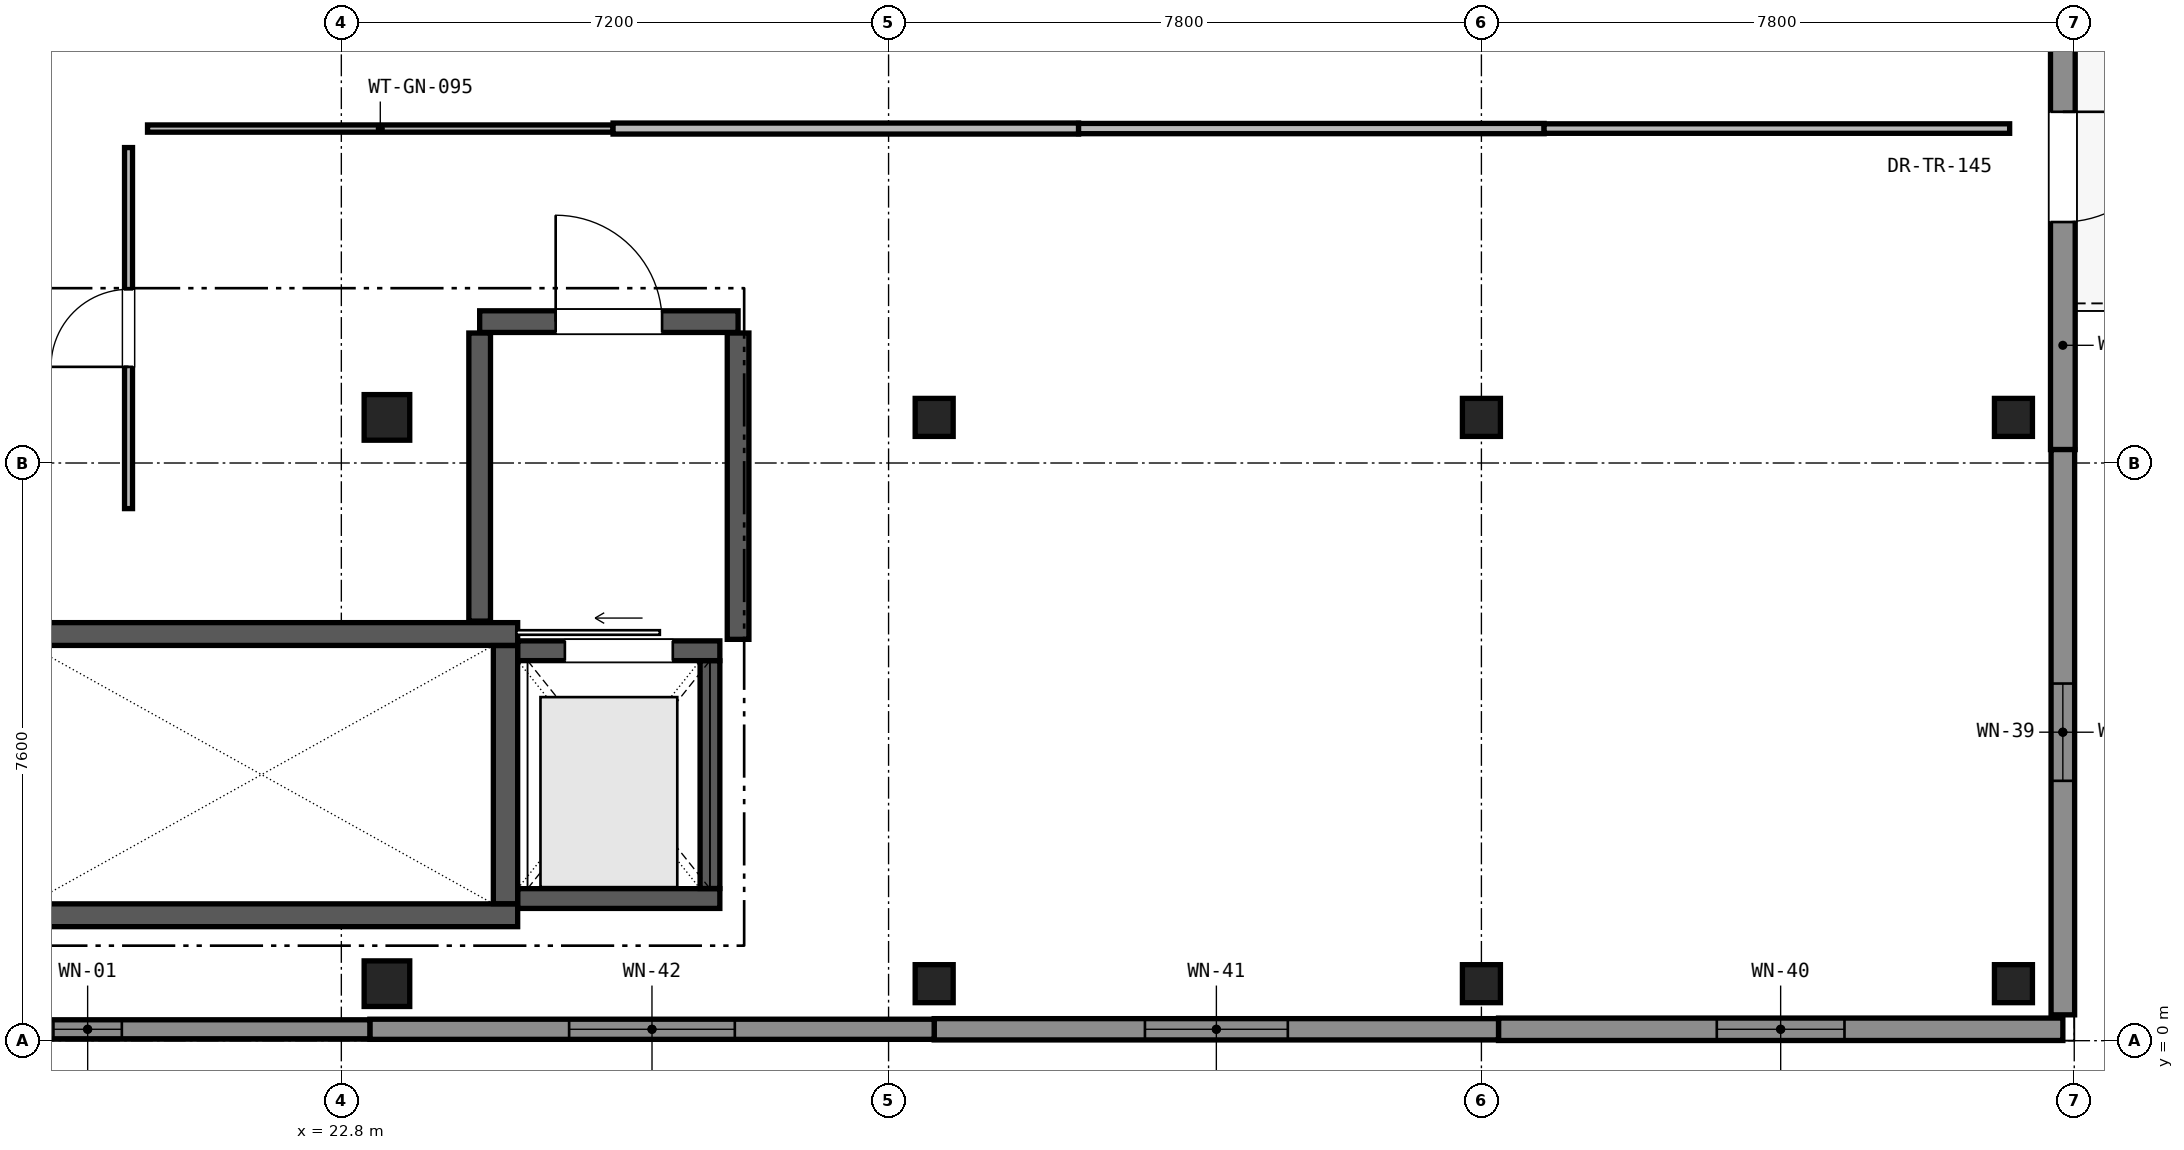
"""IFC4 building model, lengths in metres.
Left out: names, types, materials, properties, quantities, classifications, styles, units other than length and angle.
Written with IfcOpenShell. Run it as: python <this file> out.ifc"""

import sys

from ifc_helpers import new_model, si_unit, direction, frame, frame_2d, origin, origin_2d, place, context, subcontext, project, spatial, rectangle, extrude, element, fill, save


model = new_model("IFC4")
c1 = context("Model", 3, precision=1e-05, world=origin(), true_north=direction((0.0, 1.0)))
c2 = subcontext(c1, "Body", "Model", "MODEL_VIEW")
j1 = project(units=[si_unit("LENGTHUNIT", "METRE"), si_unit("PLANEANGLEUNIT", "RADIAN")], contexts=[c1])
p1 = place(None, origin())
s1 = spatial("IfcSite", under=j1, at=p1, CompositionType="ELEMENT")
p2 = place(p1, origin())
s2 = spatial("IfcBuilding", under=s1, at=p2, CompositionType="ELEMENT")
p3 = place(p2, frame((0.0, 0.0, 21.76)))
s3 = spatial("IfcBuildingStorey", under=s2, at=p3, CompositionType="ELEMENT", Elevation=21.76)
for number, where, z_axis, x_axis in (
    (1, (23.4, 0.75, 0.0), (0.0, 0.0, 1.0), (1.0, 0.0, 0.0)),
    (2, (23.4, 8.2, 0.0), (0.0, 0.0, 1.0), (1.0, 0.0, 0.0)),
):
    element("IfcColumn", number, at=place(p3, frame(where, z_axis=z_axis, x_axis=x_axis)), inside=s3, PredefinedType="COLUMN", context=c2, shape_type="SweptSolid", body=[
        extrude(rectangle(XDim=0.6, YDim=0.6, at=origin_2d()), origin(), (0.0, 0.0, 1.0), 4.08),
    ])
for number, where, z_axis, x_axis in (
    (3, (30.6, 0.75, 0.0), (0.0, 0.0, 1.0), (1.0, 0.0, 0.0)),
    (4, (30.6, 8.2, 0.0), (0.0, 0.0, 1.0), (1.0, 0.0, 0.0)),
    (5, (37.8, 0.75, 0.0), (0.0, 0.0, 1.0), (1.0, 0.0, 0.0)),
    (6, (37.8, 8.2, 0.0), (0.0, 0.0, 1.0), (1.0, 0.0, 0.0)),
    (7, (44.8, 0.75, 0.0), (0.0, 0.0, 1.0), (1.0, 0.0, 0.0)),
    (8, (44.8, 8.2, 0.0), (0.0, 0.0, 1.0), (1.0, 0.0, 0.0)),
):
    element("IfcColumn", number, at=place(p3, frame(where, z_axis=z_axis, x_axis=x_axis)), inside=s3, PredefinedType="COLUMN", context=c2, shape_type="SweptSolid", body=[
        extrude(rectangle(XDim=0.5, YDim=0.5, at=origin_2d()), origin(), (0.0, 0.0, 1.0), 4.08),
    ])
p4 = place(p3, frame((45.45, 15.213, 0.0), z_axis=(0.0, 0.0, 1.0), x_axis=(0.0, -1.0, 0.0)))
e9 = element("IfcWall", 9, at=p4, inside=s3, PredefinedType="SOLIDWALL", context=c2, shape_type="SweptSolid", body=[
    extrude(rectangle(XDim=7.437, YDim=0.325, at=frame_2d((3.718, 0.0))), origin(), (0.0, 0.0, 1.0), 3.81),
])
p5 = place(p4, frame((2.993, 0.0, 0.0)))
e10 = element("IfcOpeningElement", 10, at=p5, cuts=e9, PredefinedType="OPENING", context=c2, shape_type="SweptSolid", body=[
    extrude(rectangle(XDim=1.45, YDim=2.2, at=frame_2d((0.725, 1.1))), frame((0.0, 0.172, 0.0), z_axis=(0.0, -1.0, 0.0), x_axis=(1.0, 0.0, 0.0)), (0.0, 0.0, 1.0), 0.345),
])
p6 = place(p3, frame((45.45, 7.777, 0.0), z_axis=(0.0, 0.0, 1.0), x_axis=(0.0, -1.0, 0.0)))
e11 = element("IfcWall", 11, at=p6, inside=s3, PredefinedType="SOLIDWALL", context=c2, shape_type="SweptSolid", body=[
    extrude(rectangle(XDim=7.437, YDim=0.31, at=frame_2d((3.718, 0.0))), origin(), (0.0, 0.0, 1.0), 3.81),
])
p7 = place(p6, frame((3.078, 0.0, 0.9)))
e12 = element("IfcOpeningElement", 12, at=p7, cuts=e11, PredefinedType="OPENING", context=c2, shape_type="SweptSolid", body=[
    extrude(rectangle(XDim=1.28, YDim=1.88, at=frame_2d((0.64, 0.94))), frame((0.0, 0.165, 0.0), z_axis=(0.0, -1.0, 0.0), x_axis=(1.0, 0.0, 0.0)), (0.0, 0.0, 1.0), 0.33),
])
p8 = place(p3, frame((45.45, 0.15, 0.0), z_axis=(0.0, 0.0, 1.0), x_axis=(-1.0, 0.0, 0.0)))
e13 = element("IfcWall", 13, at=p8, inside=s3, PredefinedType="SOLIDWALL", context=c2, shape_type="SweptSolid", body=[
    extrude(rectangle(XDim=7.425, YDim=0.295, at=frame_2d((3.712, 0.0))), origin(), (0.0, 0.0, 1.0), 3.81),
])
p9 = place(p8, frame((2.873, 0.0, 0.9)))
e14 = element("IfcOpeningElement", 14, at=p9, cuts=e13, PredefinedType="OPENING", context=c2, shape_type="SweptSolid", body=[
    extrude(rectangle(XDim=1.68, YDim=1.88, at=frame_2d((0.84, 0.94))), frame((0.0, 0.157, 0.0), z_axis=(0.0, -1.0, 0.0), x_axis=(1.0, 0.0, 0.0)), (0.0, 0.0, 1.0), 0.315),
])
p10 = place(p3, frame((38.025, 0.15, 0.0), z_axis=(0.0, 0.0, 1.0), x_axis=(-1.0, 0.0, 0.0)))
e15 = element("IfcWall", 15, at=p10, inside=s3, PredefinedType="SOLIDWALL", context=c2, shape_type="SweptSolid", body=[
    extrude(rectangle(XDim=7.425, YDim=0.28, at=frame_2d((3.712, 0.0))), origin(), (0.0, 0.0, 1.0), 3.81),
])
p11 = place(p10, frame((2.772, 0.0, 0.9)))
e16 = element("IfcOpeningElement", 16, at=p11, cuts=e15, PredefinedType="OPENING", context=c2, shape_type="SweptSolid", body=[
    extrude(rectangle(XDim=1.88, YDim=1.88, at=frame_2d((0.94, 0.94))), frame((0.0, 0.15, 0.0), z_axis=(0.0, -1.0, 0.0), x_axis=(1.0, 0.0, 0.0)), (0.0, 0.0, 1.0), 0.3),
])
p12 = place(p3, frame((30.6, 0.15, 0.0), z_axis=(0.0, 0.0, 1.0), x_axis=(-1.0, 0.0, 0.0)))
e17 = element("IfcWall", 17, at=p12, inside=s3, PredefinedType="SOLIDWALL", context=c2, shape_type="SweptSolid", body=[
    extrude(rectangle(XDim=7.425, YDim=0.265, at=frame_2d((3.712, 0.0))), origin(), (0.0, 0.0, 1.0), 3.81),
])
p13 = place(p12, frame((2.623, 0.0, 0.9)))
e18 = element("IfcOpeningElement", 18, at=p13, cuts=e17, PredefinedType="OPENING", context=c2, shape_type="SweptSolid", body=[
    extrude(rectangle(XDim=2.18, YDim=1.88, at=frame_2d((1.09, 0.94))), frame((0.0, 0.142, 0.0), z_axis=(0.0, -1.0, 0.0), x_axis=(1.0, 0.0, 0.0)), (0.0, 0.0, 1.0), 0.285),
])
p14 = place(p3, frame((23.175, 0.15, 0.0), z_axis=(0.0, 0.0, 1.0), x_axis=(-1.0, 0.0, 0.0)))
e19 = element("IfcWall", 19, at=p14, inside=s3, PredefinedType="SOLIDWALL", context=c2, shape_type="SweptSolid", body=[
    extrude(rectangle(XDim=7.425, YDim=0.25, at=frame_2d((3.712, 0.0))), origin(), (0.0, 0.0, 1.0), 3.81),
])
p15 = place(p14, frame((3.263, 0.0, 0.9)))
e20 = element("IfcOpeningElement", 20, at=p15, cuts=e19, PredefinedType="OPENING", context=c2, shape_type="SweptSolid", body=[
    extrude(rectangle(XDim=0.9, YDim=1.5, at=frame_2d((0.45, 0.75))), frame((0.0, 0.135, 0.0), z_axis=(0.0, -1.0, 0.0), x_axis=(1.0, 0.0, 0.0)), (0.0, 0.0, 1.0), 0.27),
])
p16 = place(p3, frame((15.62, 0.13, 4.08), z_axis=(0.0, 0.0, 1.0), x_axis=(1.0, 0.0, 0.0)))
e21 = element("IfcWall", 21, at=p16, inside=s3, PredefinedType="PARAPET", context=c2, shape_type="SweptSolid", body=[
    extrude(rectangle(XDim=29.85, YDim=0.245, at=frame_2d((14.925, 0.0))), origin(), (0.0, 0.0, 1.0), 1.2),
])
p17 = place(p3, frame((45.47, 0.28, 4.08), z_axis=(0.0, 0.0, 1.0), x_axis=(0.0, 1.0, 0.0)))
e22 = element("IfcWall", 22, at=p17, inside=s3, PredefinedType="PARAPET", context=c2, shape_type="SweptSolid", body=[
    extrude(rectangle(XDim=22.24, YDim=0.245, at=frame_2d((11.12, 0.0))), origin(), (0.0, 0.0, 1.0), 1.2),
])
p18 = place(p3, frame((16.7, 1.65, 0.0), z_axis=(0.0, 0.0, 1.0), x_axis=(1.0, 0.0, 0.0)))
e23 = element("IfcWall", 23, at=p18, inside=s3, PredefinedType="SHEAR", context=c2, shape_type="SweptSolid", body=[
    extrude(rectangle(XDim=8.42, YDim=0.3, at=frame_2d((4.21, 0.0))), origin(), (0.0, 0.0, 1.0), 3.81),
])
p19 = place(p3, frame((16.7, 5.35, 0.0), z_axis=(0.0, 0.0, 1.0), x_axis=(1.0, 0.0, 0.0)))
e24 = element("IfcWall", 24, at=p19, inside=s3, PredefinedType="SHEAR", context=c2, shape_type="SweptSolid", body=[
    extrude(rectangle(XDim=8.42, YDim=0.3, at=frame_2d((4.21, 0.0))), origin(), (0.0, 0.0, 1.0), 3.81),
])
p20 = place(p19, frame((0.55, 0.0, 0.0)))
e25 = element("IfcOpeningElement", 25, at=p20, cuts=e24, PredefinedType="OPENING", context=c2, shape_type="SweptSolid", body=[
    extrude(rectangle(XDim=1.2, YDim=2.2, at=frame_2d((0.6, 1.1))), frame((0.0, 0.16, 0.0), z_axis=(0.0, -1.0, 0.0), x_axis=(1.0, 0.0, 0.0)), (0.0, 0.0, 1.0), 0.32),
])
p21 = place(p3, frame((24.96, 1.802, 0.0), z_axis=(0.0, 0.0, 1.0), x_axis=(0.0, 1.0, 0.0)))
e26 = element("IfcWall", 26, at=p21, inside=s3, PredefinedType="SHEAR", context=c2, shape_type="SweptSolid", body=[
    extrude(rectangle(XDim=3.396, YDim=0.32, at=frame_2d((1.698, 0.0))), origin(), (0.0, 0.0, 1.0), 3.81),
])
p22 = place(p3, frame((25.122, 1.87, 0.0), z_axis=(0.0, 0.0, 1.0), x_axis=(1.0, 0.0, 0.0)))
e27 = element("IfcWall", 27, at=p22, inside=s3, PredefinedType="SHEAR", context=c2, shape_type="SweptSolid", body=[
    extrude(rectangle(XDim=2.658, YDim=0.26, at=frame_2d((1.329, 0.0))), origin(), (0.0, 0.0, 1.0), 3.81),
])
p23 = place(p3, frame((25.122, 5.13, 0.0), z_axis=(0.0, 0.0, 1.0), x_axis=(1.0, 0.0, 0.0)))
e28 = element("IfcWall", 28, at=p23, inside=s3, PredefinedType="SHEAR", context=c2, shape_type="SweptSolid", body=[
    extrude(rectangle(XDim=2.658, YDim=0.26, at=frame_2d((1.329, 0.0))), origin(), (0.0, 0.0, 1.0), 3.81),
])
p24 = place(p23, frame((0.619, 0.0, 0.0)))
e29 = element("IfcOpeningElement", 29, at=p24, cuts=e28, PredefinedType="OPENING", context=c2, shape_type="SweptSolid", body=[
    extrude(rectangle(XDim=1.42, YDim=2.25, at=frame_2d((0.71, 1.125))), frame((0.0, 0.14, 0.0), z_axis=(0.0, -1.0, 0.0), x_axis=(1.0, 0.0, 0.0)), (0.0, 0.0, 1.0), 0.28),
])
p25 = place(p3, frame((27.65, 2.002, 0.0), z_axis=(0.0, 0.0, 1.0), x_axis=(0.0, 1.0, 0.0)))
e30 = element("IfcWall", 30, at=p25, inside=s3, PredefinedType="SHEAR", context=c2, shape_type="SweptSolid", body=[
    extrude(rectangle(XDim=2.996, YDim=0.26, at=frame_2d((1.498, 0.0))), origin(), (0.0, 0.0, 1.0), 3.81),
])
p26 = place(p3, frame((24.62, 9.46, 0.0), z_axis=(0.0, 0.0, 1.0), x_axis=(1.0, 0.0, 0.0)))
e31 = element("IfcWall", 31, at=p26, inside=s3, PredefinedType="SHEAR", context=c2, shape_type="SweptSolid", body=[
    extrude(rectangle(XDim=3.4, YDim=0.285, at=frame_2d((1.7, 0.0))), origin(), (0.0, 0.0, 1.0), 3.81),
])
p27 = place(p26, frame((1.0, 0.0, 0.0)))
e32 = element("IfcOpeningElement", 32, at=p27, cuts=e31, PredefinedType="OPENING", context=c2, shape_type="SweptSolid", body=[
    extrude(rectangle(XDim=1.4, YDim=2.25, at=frame_2d((0.7, 1.125))), frame((0.0, 0.152, 0.0), z_axis=(0.0, -1.0, 0.0), x_axis=(1.0, 0.0, 0.0)), (0.0, 0.0, 1.0), 0.305),
])
p28 = place(p3, frame((24.62, 5.52, 0.0), z_axis=(0.0, 0.0, 1.0), x_axis=(0.0, 1.0, 0.0)))
e33 = element("IfcWall", 33, at=p28, inside=s3, PredefinedType="SHEAR", context=c2, shape_type="SweptSolid", body=[
    extrude(rectangle(XDim=3.79, YDim=0.285, at=frame_2d((1.895, 0.0))), origin(), (0.0, 0.0, 1.0), 2.86),
])
p29 = place(p3, frame((28.02, 5.28, 0.0), z_axis=(0.0, 0.0, 1.0), x_axis=(0.0, 1.0, 0.0)))
e34 = element("IfcWall", 34, at=p29, inside=s3, PredefinedType="SHEAR", context=c2, shape_type="SweptSolid", body=[
    extrude(rectangle(XDim=4.03, YDim=0.285, at=frame_2d((2.015, 0.0))), origin(), (0.0, 0.0, 1.0), 2.86),
])
p30 = place(p3, frame((20.0, 7.0, 0.0), z_axis=(0.0, 0.0, 1.0), x_axis=(0.0, 1.0, 0.0)))
e35 = element("IfcWall", 35, at=p30, inside=s3, PredefinedType="PARTITIONING", context=c2, shape_type="SweptSolid", body=[
    extrude(rectangle(XDim=4.75, YDim=0.105, at=frame_2d((2.375, 0.0))), origin(), (0.0, 0.0, 1.0), 2.86),
])
p31 = place(p30, frame((1.865, 0.0, 0.0)))
e36 = element("IfcOpeningElement", 36, at=p31, cuts=e35, PredefinedType="OPENING", context=c2, shape_type="SweptSolid", body=[
    extrude(rectangle(XDim=1.02, YDim=2.15, at=frame_2d((0.51, 1.075))), frame((0.0, 0.062, 0.0), z_axis=(0.0, -1.0, 0.0), x_axis=(1.0, 0.0, 0.0)), (0.0, 0.0, 1.0), 0.125),
])
p32 = place(p3, frame((20.25, 12.0, 0.0), z_axis=(0.0, 0.0, 1.0), x_axis=(1.0, 0.0, 0.0)))
e37 = element("IfcWall", 37, at=p32, inside=s3, PredefinedType="PARTITIONING", context=c2, shape_type="SweptSolid", body=[
    extrude(rectangle(XDim=6.125, YDim=0.095, at=frame_2d((3.062, 0.0))), origin(), (0.0, 0.0, 1.0), 3.21),
])
p33 = place(p3, frame((26.375, 12.0, 0.0), z_axis=(0.0, 0.0, 1.0), x_axis=(1.0, 0.0, 0.0)))
e38 = element("IfcWall", 38, at=p33, inside=s3, PredefinedType="PARTITIONING", context=c2, shape_type="SweptSolid", body=[
    extrude(rectangle(XDim=6.125, YDim=0.145, at=frame_2d((3.062, 0.0))), origin(), (0.0, 0.0, 1.0), 3.06),
])
p34 = place(p3, frame((32.5, 12.0, 0.0), z_axis=(0.0, 0.0, 1.0), x_axis=(1.0, 0.0, 0.0)))
e39 = element("IfcWall", 39, at=p34, inside=s3, PredefinedType="PARTITIONING", context=c2, shape_type="SweptSolid", body=[
    extrude(rectangle(XDim=6.125, YDim=0.135, at=frame_2d((3.062, 0.0))), origin(), (0.0, 0.0, 1.0), 3.26),
])
p35 = place(p3, frame((38.625, 12.0, 0.0), z_axis=(0.0, 0.0, 1.0), x_axis=(1.0, 0.0, 0.0)))
e40 = element("IfcWall", 40, at=p35, inside=s3, PredefinedType="PARTITIONING", context=c2, shape_type="SweptSolid", body=[
    extrude(rectangle(XDim=6.125, YDim=0.125, at=frame_2d((3.062, 0.0))), origin(), (0.0, 0.0, 1.0), 3.16),
])
p36 = place(p5, origin())
e41 = element("IfcDoor", 41, at=p36, inside=s3, OperationType="SINGLE_SWING_LEFT", PredefinedType="DOOR", context=c2, shape_type="SweptSolid", body=[
    extrude(rectangle(XDim=1.45, YDim=2.2, at=frame_2d((0.725, 1.1))), frame((0.0, 0.025, 0.0), z_axis=(0.0, -1.0, 0.0), x_axis=(1.0, 0.0, 0.0)), (0.0, 0.0, 1.0), 0.05),
])
fill(e10, e41)
p37 = place(p7, origin())
e42 = element("IfcWindow", 42, at=p37, inside=s3, PartitioningType="SINGLE_PANEL", PredefinedType="WINDOW", context=c2, shape_type="SweptSolid", body=[
    extrude(rectangle(XDim=1.28, YDim=1.88, at=frame_2d((0.64, 0.94))), frame((0.0, 0.03, 0.0), z_axis=(0.0, -1.0, 0.0), x_axis=(1.0, 0.0, 0.0)), (0.0, 0.0, 1.0), 0.06),
])
fill(e12, e42)
p38 = place(p9, origin())
e43 = element("IfcWindow", 43, at=p38, inside=s3, PartitioningType="SINGLE_PANEL", PredefinedType="WINDOW", context=c2, shape_type="SweptSolid", body=[
    extrude(rectangle(XDim=1.68, YDim=1.88, at=frame_2d((0.84, 0.94))), frame((0.0, 0.03, 0.0), z_axis=(0.0, -1.0, 0.0), x_axis=(1.0, 0.0, 0.0)), (0.0, 0.0, 1.0), 0.06),
])
fill(e14, e43)
p39 = place(p11, origin())
e44 = element("IfcWindow", 44, at=p39, inside=s3, PartitioningType="SINGLE_PANEL", PredefinedType="WINDOW", context=c2, shape_type="SweptSolid", body=[
    extrude(rectangle(XDim=1.88, YDim=1.88, at=frame_2d((0.94, 0.94))), frame((0.0, 0.03, 0.0), z_axis=(0.0, -1.0, 0.0), x_axis=(1.0, 0.0, 0.0)), (0.0, 0.0, 1.0), 0.06),
])
fill(e16, e44)
p40 = place(p13, origin())
e45 = element("IfcWindow", 45, at=p40, inside=s3, PartitioningType="SINGLE_PANEL", PredefinedType="WINDOW", context=c2, shape_type="SweptSolid", body=[
    extrude(rectangle(XDim=2.18, YDim=1.88, at=frame_2d((1.09, 0.94))), frame((0.0, 0.03, 0.0), z_axis=(0.0, -1.0, 0.0), x_axis=(1.0, 0.0, 0.0)), (0.0, 0.0, 1.0), 0.06),
])
fill(e18, e45)
p41 = place(p15, origin())
e46 = element("IfcWindow", 46, at=p41, inside=s3, PartitioningType="SINGLE_PANEL", PredefinedType="WINDOW", context=c2, shape_type="SweptSolid", body=[
    extrude(rectangle(XDim=0.9, YDim=1.5, at=frame_2d((0.45, 0.75))), frame((0.0, 0.03, 0.0), z_axis=(0.0, -1.0, 0.0), x_axis=(1.0, 0.0, 0.0)), (0.0, 0.0, 1.0), 0.06),
])
fill(e20, e46)
p42 = place(p24, origin())
e47 = element("IfcDoor", 47, at=p42, inside=s3, OperationType="SLIDING_TO_LEFT", PredefinedType="DOOR", context=c2, shape_type="SweptSolid", body=[
    extrude(rectangle(XDim=1.42, YDim=2.25, at=frame_2d((0.71, 1.125))), frame((0.0, 0.025, 0.0), z_axis=(0.0, -1.0, 0.0), x_axis=(1.0, 0.0, 0.0)), (0.0, 0.0, 1.0), 0.05),
])
fill(e29, e47)
p43 = place(p27, origin())
e48 = element("IfcDoor", 48, at=p43, inside=s3, OperationType="SINGLE_SWING_LEFT", PredefinedType="DOOR", context=c2, shape_type="SweptSolid", body=[
    extrude(rectangle(XDim=1.4, YDim=2.25, at=frame_2d((0.7, 1.125))), frame((0.0, 0.025, 0.0), z_axis=(0.0, -1.0, 0.0), x_axis=(1.0, 0.0, 0.0)), (0.0, 0.0, 1.0), 0.05),
])
fill(e32, e48)
p44 = place(p31, origin())
e49 = element("IfcDoor", 49, at=p44, inside=s3, OperationType="SINGLE_SWING_LEFT", PredefinedType="DOOR", context=c2, shape_type="SweptSolid", body=[
    extrude(rectangle(XDim=1.02, YDim=2.15, at=frame_2d((0.51, 1.075))), frame((0.0, 0.025, 0.0), z_axis=(0.0, -1.0, 0.0), x_axis=(1.0, 0.0, 0.0)), (0.0, 0.0, 1.0), 0.05),
])
fill(e36, e49)
save(model, sys.argv[1])
